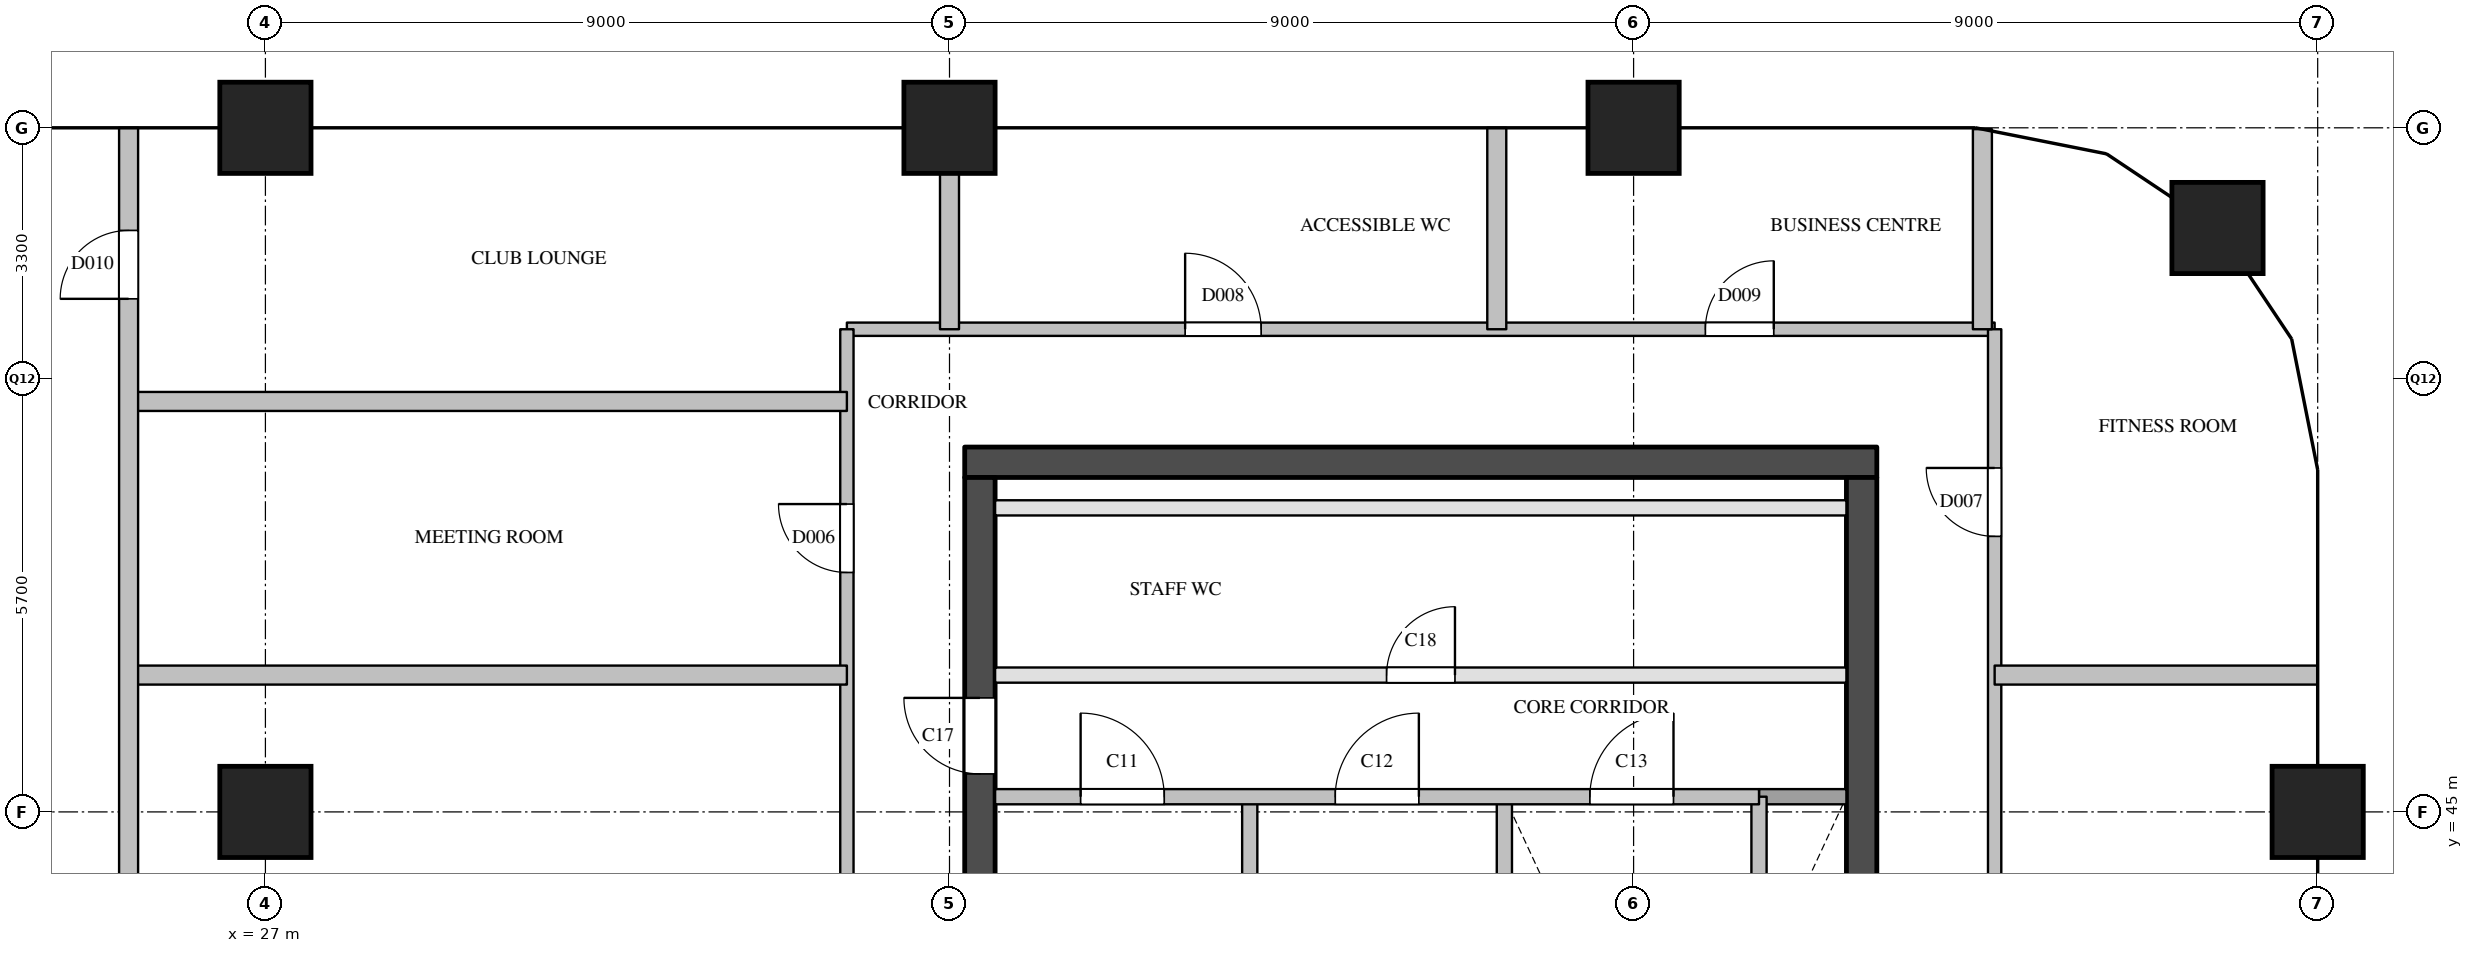
"""IFC4 building model, lengths in metres.
Left out: names, types, materials, properties, quantities, classifications, styles, units other than length and angle.
Written with IfcOpenShell. Run it as: python <this file> out.ifc"""

import sys

from ifc_helpers import new_model, si_unit, direction, frame, frame_2d, origin, origin_2d, place, context, subcontext, project, spatial, rectangle, extrude, element, fill, save


model = new_model("IFC4")
c1 = context("Model", 3, precision=1e-05, world=origin(), true_north=direction((0.0, 1.0)))
c2 = subcontext(c1, "Body", "Model", "MODEL_VIEW")
j1 = project(units=[si_unit("LENGTHUNIT", "METRE"), si_unit("PLANEANGLEUNIT", "RADIAN")], contexts=[c1])
p1 = place(None, origin())
s1 = spatial("IfcSite", under=j1, at=p1, CompositionType="ELEMENT")
p2 = place(p1, origin())
s2 = spatial("IfcBuilding", under=s1, at=p2, CompositionType="ELEMENT")
p3 = place(p2, frame((0.0, 0.0, 281.3)))
s3 = spatial("IfcBuildingStorey", under=s2, at=p3, CompositionType="ELEMENT", Elevation=281.3)
for number, where, z_axis, x_axis in (
    (1, (27.0, 45.0, 0.0), (0.0, 0.0, 1.0), (1.0, 0.0, 0.0)),
    (2, (27.0, 54.0, 0.0), (0.0, 0.0, 1.0), (1.0, 0.0, 0.0)),
    (3, (36.0, 54.0, 0.0), (0.0, 0.0, 1.0), (1.0, 0.0, 0.0)),
    (4, (45.0, 54.0, 0.0), (0.0, 0.0, 1.0), (1.0, 0.0, 0.0)),
    (5, (54.0, 45.0, 0.0), (0.0, 0.0, 1.0), (1.0, 0.0, 0.0)),
    (6, (52.682, 52.682, 0.0), (0.0, 0.0, 1.0), (1.0, 0.0, 0.0)),
):
    element("IfcColumn", number, at=place(p3, frame(where, z_axis=z_axis, x_axis=x_axis)), inside=s3, PredefinedType="COLUMN", context=c2, shape_type="SweptSolid", body=[
        extrude(rectangle(XDim=1.2, YDim=1.2, at=origin_2d()), origin(), (0.0, 0.0, 1.0), 3.9),
    ])
p4 = place(p3, frame((36.2, 49.6, 0.0), z_axis=(0.0, 0.0, 1.0), x_axis=(1.0, 0.0, 0.0)))
e7 = element("IfcWall", 7, at=p4, inside=s3, PredefinedType="SHEAR", context=c2, shape_type="SweptSolid", body=[
    extrude(rectangle(XDim=12.0, YDim=0.4, at=frame_2d((6.0, 0.0))), origin(), (0.0, 0.0, 1.0), 3.6),
])
p5 = place(p3, frame((36.4, 29.1, 0.0), z_axis=(0.0, 0.0, 1.0), x_axis=(0.0, 1.0, 0.0)))
e8 = element("IfcWall", 8, at=p5, inside=s3, PredefinedType="SHEAR", context=c2, shape_type="SweptSolid", body=[
    extrude(rectangle(XDim=20.3, YDim=0.4, at=frame_2d((10.15, 0.0))), origin(), (0.0, 0.0, 1.0), 3.6),
])
p6 = place(p5, frame((3.6, 0.0, 0.0)))
e9 = element("IfcOpeningElement", 9, at=p6, cuts=e8, PredefinedType="OPENING", context=c2, shape_type="SweptSolid", body=[
    extrude(rectangle(XDim=1.8, YDim=2.1, at=frame_2d((0.9, 1.05))), frame((0.0, 0.21, 0.0), z_axis=(0.0, -1.0, 0.0), x_axis=(1.0, 0.0, 0.0)), (0.0, 0.0, 1.0), 0.42),
])
p7 = place(p5, frame((16.4, 0.0, 0.0)))
e10 = element("IfcOpeningElement", 10, at=p7, cuts=e8, PredefinedType="OPENING", context=c2, shape_type="SweptSolid", body=[
    extrude(rectangle(XDim=1.0, YDim=2.1, at=frame_2d((0.5, 1.05))), frame((0.0, 0.21, 0.0), z_axis=(0.0, -1.0, 0.0), x_axis=(1.0, 0.0, 0.0)), (0.0, 0.0, 1.0), 0.42),
])
p8 = place(p3, frame((48.0, 29.1, 0.0), z_axis=(0.0, 0.0, 1.0), x_axis=(0.0, 1.0, 0.0)))
e11 = element("IfcWall", 11, at=p8, inside=s3, PredefinedType="SHEAR", context=c2, shape_type="SweptSolid", body=[
    extrude(rectangle(XDim=20.3, YDim=0.4, at=frame_2d((10.15, 0.0))), origin(), (0.0, 0.0, 1.0), 3.6),
])
p9 = place(p8, frame((12.5, 0.0, 0.0)))
e12 = element("IfcOpeningElement", 12, at=p9, cuts=e11, PredefinedType="OPENING", context=c2, shape_type="SweptSolid", body=[
    extrude(rectangle(XDim=0.7, YDim=2.1, at=frame_2d((0.35, 1.05))), frame((0.0, 0.21, 0.0), z_axis=(0.0, -1.0, 0.0), x_axis=(1.0, 0.0, 0.0)), (0.0, 0.0, 1.0), 0.42),
])
p10 = place(p8, frame((3.9, 0.0, 0.0)))
e13 = element("IfcOpeningElement", 13, at=p10, cuts=e11, PredefinedType="OPENING", context=c2, shape_type="SweptSolid", body=[
    extrude(rectangle(XDim=1.8, YDim=2.1, at=frame_2d((0.9, 1.05))), frame((0.0, 0.21, 0.0), z_axis=(0.0, -1.0, 0.0), x_axis=(1.0, 0.0, 0.0)), (0.0, 0.0, 1.0), 0.42),
])
for number, where, z_axis, x_axis in (
    (14, (39.95, 40.78, 0.0), (0.0, 0.0, 1.0), (0.0, 1.0, 0.0)),
    (15, (43.3, 40.78, 0.0), (0.0, 0.0, 1.0), (0.0, 1.0, 0.0)),
    (16, (46.65, 40.78, 0.0), (0.0, 0.0, 1.0), (0.0, 1.0, 0.0)),
):
    element("IfcWall", number, at=place(p3, frame(where, z_axis=z_axis, x_axis=x_axis)), inside=s3, PredefinedType="SOLIDWALL", context=c2, shape_type="SweptSolid", body=[
        extrude(rectangle(XDim=4.42, YDim=0.2, at=frame_2d((2.21, 0.0))), origin(), (0.0, 0.0, 1.0), 3.6),
    ])
p11 = place(p3, frame((46.65, 45.2, 0.0), z_axis=(0.0, 0.0, 1.0), x_axis=(1.0, 0.0, 0.0)))
e17 = element("IfcWall", 17, at=p11, inside=s3, PredefinedType="SOLIDWALL", context=c2, shape_type="SweptSolid", body=[
    extrude(rectangle(XDim=1.15, YDim=0.2, at=frame_2d((0.575, 0.0))), origin(), (0.0, 0.0, 1.0), 3.6),
])
p12 = place(p3, frame((36.6, 45.2, 0.0), z_axis=(0.0, 0.0, 1.0), x_axis=(1.0, 0.0, 0.0)))
e18 = element("IfcWall", 18, at=p12, inside=s3, PredefinedType="SOLIDWALL", context=c2, shape_type="SweptSolid", body=[
    extrude(rectangle(XDim=10.05, YDim=0.2, at=frame_2d((5.025, 0.0))), origin(), (0.0, 0.0, 1.0), 3.6),
])
p13 = place(p12, frame((1.125, 0.0, 0.0)))
e19 = element("IfcOpeningElement", 19, at=p13, cuts=e18, PredefinedType="OPENING", context=c2, shape_type="SweptSolid", body=[
    extrude(rectangle(XDim=1.1, YDim=2.1, at=frame_2d((0.55, 1.05))), frame((0.0, 0.11, 0.0), z_axis=(0.0, -1.0, 0.0), x_axis=(1.0, 0.0, 0.0)), (0.0, 0.0, 1.0), 0.22),
])
p14 = place(p12, frame((4.475, 0.0, 0.0)))
e20 = element("IfcOpeningElement", 20, at=p14, cuts=e18, PredefinedType="OPENING", context=c2, shape_type="SweptSolid", body=[
    extrude(rectangle(XDim=1.1, YDim=2.1, at=frame_2d((0.55, 1.05))), frame((0.0, 0.11, 0.0), z_axis=(0.0, -1.0, 0.0), x_axis=(1.0, 0.0, 0.0)), (0.0, 0.0, 1.0), 0.22),
])
p15 = place(p12, frame((7.825, 0.0, 0.0)))
e21 = element("IfcOpeningElement", 21, at=p15, cuts=e18, PredefinedType="OPENING", context=c2, shape_type="SweptSolid", body=[
    extrude(rectangle(XDim=1.1, YDim=2.1, at=frame_2d((0.55, 1.05))), frame((0.0, 0.11, 0.0), z_axis=(0.0, -1.0, 0.0), x_axis=(1.0, 0.0, 0.0)), (0.0, 0.0, 1.0), 0.22),
])
p16 = place(p3, frame((36.6, 46.8, 0.0), z_axis=(0.0, 0.0, 1.0), x_axis=(1.0, 0.0, 0.0)))
e22 = element("IfcWall", 22, at=p16, inside=s3, PredefinedType="PARTITIONING", context=c2, shape_type="SweptSolid", body=[
    extrude(rectangle(XDim=11.2, YDim=0.2, at=frame_2d((5.6, 0.0))), origin(), (0.0, 0.0, 1.0), 3.6),
])
p17 = place(p16, frame((5.15, 0.0, 0.0)))
e23 = element("IfcOpeningElement", 23, at=p17, cuts=e22, PredefinedType="OPENING", context=c2, shape_type="SweptSolid", body=[
    extrude(rectangle(XDim=0.9, YDim=2.1, at=frame_2d((0.45, 1.05))), frame((0.0, 0.11, 0.0), z_axis=(0.0, -1.0, 0.0), x_axis=(1.0, 0.0, 0.0)), (0.0, 0.0, 1.0), 0.22),
])
p18 = place(p3, frame((36.6, 49.0, 0.0), z_axis=(0.0, 0.0, 1.0), x_axis=(1.0, 0.0, 0.0)))
e24 = element("IfcWall", 24, at=p18, inside=s3, PredefinedType="PARTITIONING", context=c2, shape_type="SweptSolid", body=[
    extrude(rectangle(XDim=11.2, YDim=0.2, at=frame_2d((5.6, 0.0))), origin(), (0.0, 0.0, 1.0), 3.6),
])
p19 = place(p3, frame((34.65, 51.35, 0.0), z_axis=(0.0, 0.0, 1.0), x_axis=(1.0, 0.0, 0.0)))
e25 = element("IfcWall", 25, at=p19, inside=s3, PredefinedType="PARTITIONING", context=c2, shape_type="SweptSolid", body=[
    extrude(rectangle(XDim=15.1, YDim=0.175, at=frame_2d((7.55, 0.0))), origin(), (0.0, 0.0, 1.0), 3.6),
])
p20 = place(p19, frame((4.45, 0.0, 0.0)))
e26 = element("IfcOpeningElement", 26, at=p20, cuts=e25, PredefinedType="OPENING", context=c2, shape_type="SweptSolid", body=[
    extrude(rectangle(XDim=1.0, YDim=2.1, at=frame_2d((0.5, 1.05))), frame((0.0, 0.097, 0.0), z_axis=(0.0, -1.0, 0.0), x_axis=(1.0, 0.0, 0.0)), (0.0, 0.0, 1.0), 0.195),
])
p21 = place(p19, frame((11.294, 0.0, 0.0)))
e27 = element("IfcOpeningElement", 27, at=p21, cuts=e25, PredefinedType="OPENING", context=c2, shape_type="SweptSolid", body=[
    extrude(rectangle(XDim=0.9, YDim=2.1, at=frame_2d((0.45, 1.05))), frame((0.0, 0.097, 0.0), z_axis=(0.0, -1.0, 0.0), x_axis=(1.0, 0.0, 0.0)), (0.0, 0.0, 1.0), 0.195),
])
p22 = place(p3, frame((34.65, 28.5, 0.0), z_axis=(0.0, 0.0, 1.0), x_axis=(0.0, 1.0, 0.0)))
e28 = element("IfcWall", 28, at=p22, inside=s3, PredefinedType="PARTITIONING", context=c2, shape_type="SweptSolid", body=[
    extrude(rectangle(XDim=22.85, YDim=0.175, at=frame_2d((11.425, 0.0))), origin(), (0.0, 0.0, 1.0), 3.6),
])
p23 = place(p22, frame((3.3, 0.0, 0.0)))
e29 = element("IfcOpeningElement", 29, at=p23, cuts=e28, PredefinedType="OPENING", context=c2, shape_type="SweptSolid", body=[
    extrude(rectangle(XDim=0.9, YDim=2.1, at=frame_2d((0.45, 1.05))), frame((0.0, 0.097, 0.0), z_axis=(0.0, -1.0, 0.0), x_axis=(1.0, 0.0, 0.0)), (0.0, 0.0, 1.0), 0.195),
])
p24 = place(p22, frame((8.8, 0.0, 0.0)))
e30 = element("IfcOpeningElement", 30, at=p24, cuts=e28, PredefinedType="OPENING", context=c2, shape_type="SweptSolid", body=[
    extrude(rectangle(XDim=1.0, YDim=2.1, at=frame_2d((0.5, 1.05))), frame((0.0, 0.097, 0.0), z_axis=(0.0, -1.0, 0.0), x_axis=(1.0, 0.0, 0.0)), (0.0, 0.0, 1.0), 0.195),
])
p25 = place(p22, frame((14.2, 0.0, 0.0)))
e31 = element("IfcOpeningElement", 31, at=p25, cuts=e28, PredefinedType="OPENING", context=c2, shape_type="SweptSolid", body=[
    extrude(rectangle(XDim=1.0, YDim=2.1, at=frame_2d((0.5, 1.05))), frame((0.0, 0.097, 0.0), z_axis=(0.0, -1.0, 0.0), x_axis=(1.0, 0.0, 0.0)), (0.0, 0.0, 1.0), 0.195),
])
p26 = place(p22, frame((19.65, 0.0, 0.0)))
e32 = element("IfcOpeningElement", 32, at=p26, cuts=e28, PredefinedType="OPENING", context=c2, shape_type="SweptSolid", body=[
    extrude(rectangle(XDim=0.9, YDim=2.1, at=frame_2d((0.45, 1.05))), frame((0.0, 0.097, 0.0), z_axis=(0.0, -1.0, 0.0), x_axis=(1.0, 0.0, 0.0)), (0.0, 0.0, 1.0), 0.195),
])
p27 = place(p3, frame((49.75, 28.5, 0.0), z_axis=(0.0, 0.0, 1.0), x_axis=(0.0, 1.0, 0.0)))
e33 = element("IfcWall", 33, at=p27, inside=s3, PredefinedType="PARTITIONING", context=c2, shape_type="SweptSolid", body=[
    extrude(rectangle(XDim=22.85, YDim=0.175, at=frame_2d((11.425, 0.0))), origin(), (0.0, 0.0, 1.0), 3.6),
])
p28 = place(p27, frame((3.3, 0.0, 0.0)))
e34 = element("IfcOpeningElement", 34, at=p28, cuts=e33, PredefinedType="OPENING", context=c2, shape_type="SweptSolid", body=[
    extrude(rectangle(XDim=0.9, YDim=2.1, at=frame_2d((0.45, 1.05))), frame((0.0, 0.097, 0.0), z_axis=(0.0, -1.0, 0.0), x_axis=(1.0, 0.0, 0.0)), (0.0, 0.0, 1.0), 0.195),
])
p29 = place(p27, frame((12.45, 0.0, 0.0)))
e35 = element("IfcOpeningElement", 35, at=p29, cuts=e33, PredefinedType="OPENING", context=c2, shape_type="SweptSolid", body=[
    extrude(rectangle(XDim=0.9, YDim=2.1, at=frame_2d((0.45, 1.05))), frame((0.0, 0.097, 0.0), z_axis=(0.0, -1.0, 0.0), x_axis=(1.0, 0.0, 0.0)), (0.0, 0.0, 1.0), 0.195),
])
p30 = place(p27, frame((20.125, 0.0, 0.0)))
e36 = element("IfcOpeningElement", 36, at=p30, cuts=e33, PredefinedType="OPENING", context=c2, shape_type="SweptSolid", body=[
    extrude(rectangle(XDim=0.9, YDim=2.1, at=frame_2d((0.45, 1.05))), frame((0.0, 0.097, 0.0), z_axis=(0.0, -1.0, 0.0), x_axis=(1.0, 0.0, 0.0)), (0.0, 0.0, 1.0), 0.195),
])
p31 = place(p3, frame((25.2, 46.8, 0.0), z_axis=(0.0, 0.0, 1.0), x_axis=(1.0, 0.0, 0.0)))
e37 = element("IfcWall", 37, at=p31, inside=s3, PredefinedType="PARTITIONING", context=c2, shape_type="SweptSolid", body=[
    extrude(rectangle(XDim=9.45, YDim=0.25, at=frame_2d((4.725, 0.0))), origin(), (0.0, 0.0, 1.0), 2.6),
])
p32 = place(p3, frame((49.75, 46.8, 0.0), z_axis=(0.0, 0.0, 1.0), x_axis=(1.0, 0.0, 0.0)))
e38 = element("IfcWall", 38, at=p32, inside=s3, PredefinedType="PARTITIONING", context=c2, shape_type="SweptSolid", body=[
    extrude(rectangle(XDim=4.25, YDim=0.25, at=frame_2d((2.125, 0.0))), origin(), (0.0, 0.0, 1.0), 2.6),
])
p33 = place(p3, frame((25.2, 50.4, 0.0), z_axis=(0.0, 0.0, 1.0), x_axis=(1.0, 0.0, 0.0)))
e39 = element("IfcWall", 39, at=p33, inside=s3, PredefinedType="PARTITIONING", context=c2, shape_type="SweptSolid", body=[
    extrude(rectangle(XDim=9.45, YDim=0.25, at=frame_2d((4.725, 0.0))), origin(), (0.0, 0.0, 1.0), 2.6),
])
p34 = place(p3, frame((25.2, 35.875, 0.0), z_axis=(0.0, 0.0, 1.0), x_axis=(0.0, 1.0, 0.0)))
e40 = element("IfcWall", 40, at=p34, inside=s3, PredefinedType="PARTITIONING", context=c2, shape_type="SweptSolid", body=[
    extrude(rectangle(XDim=18.125, YDim=0.25, at=frame_2d((9.062, 0.0))), origin(), (0.0, 0.0, 1.0), 2.6),
])
p35 = place(p34, frame((15.875, 0.0, 0.0)))
e41 = element("IfcOpeningElement", 41, at=p35, cuts=e40, PredefinedType="OPENING", context=c2, shape_type="SweptSolid", body=[
    extrude(rectangle(XDim=0.9, YDim=2.1, at=frame_2d((0.45, 1.05))), frame((0.0, 0.135, 0.0), z_axis=(0.0, -1.0, 0.0), x_axis=(1.0, 0.0, 0.0)), (0.0, 0.0, 1.0), 0.27),
])
p36 = place(p3, frame((36.0, 51.35, 0.0), z_axis=(0.0, 0.0, 1.0), x_axis=(0.0, 1.0, 0.0)))
e42 = element("IfcWall", 42, at=p36, inside=s3, PredefinedType="PARTITIONING", context=c2, shape_type="SweptSolid", body=[
    extrude(rectangle(XDim=2.65, YDim=0.25, at=frame_2d((1.325, 0.0))), origin(), (0.0, 0.0, 1.0), 3.6),
])
p37 = place(p3, frame((43.2, 51.35, 0.0), z_axis=(0.0, 0.0, 1.0), x_axis=(0.0, 1.0, 0.0)))
e43 = element("IfcWall", 43, at=p37, inside=s3, PredefinedType="PARTITIONING", context=c2, shape_type="SweptSolid", body=[
    extrude(rectangle(XDim=2.65, YDim=0.25, at=frame_2d((1.325, 0.0))), origin(), (0.0, 0.0, 1.0), 2.6),
])
p38 = place(p3, frame((49.589, 51.35, 0.0), z_axis=(0.0, 0.0, 1.0), x_axis=(0.0, 1.0, 0.0)))
e44 = element("IfcWall", 44, at=p38, inside=s3, PredefinedType="PARTITIONING", context=c2, shape_type="SweptSolid", body=[
    extrude(rectangle(XDim=2.632, YDim=0.25, at=frame_2d((1.316, 0.0))), origin(), (0.0, 0.0, 1.0), 2.6),
])
p39 = place(p13, origin())
e45 = element("IfcDoor", 45, at=p39, inside=s3, OperationType="SINGLE_SWING_LEFT", PredefinedType="DOOR", context=c2, shape_type="SweptSolid", body=[
    extrude(rectangle(XDim=1.1, YDim=2.1, at=frame_2d((0.55, 1.05))), frame((0.0, 0.025, 0.0), z_axis=(0.0, -1.0, 0.0), x_axis=(1.0, 0.0, 0.0)), (0.0, 0.0, 1.0), 0.05),
])
fill(e19, e45)
p40 = place(p14, origin())
e46 = element("IfcDoor", 46, at=p40, inside=s3, OperationType="SINGLE_SWING_RIGHT", PredefinedType="DOOR", context=c2, shape_type="SweptSolid", body=[
    extrude(rectangle(XDim=1.1, YDim=2.1, at=frame_2d((0.55, 1.05))), frame((0.0, 0.025, 0.0), z_axis=(0.0, -1.0, 0.0), x_axis=(1.0, 0.0, 0.0)), (0.0, 0.0, 1.0), 0.05),
])
fill(e20, e46)
p41 = place(p15, origin())
e47 = element("IfcDoor", 47, at=p41, inside=s3, OperationType="SINGLE_SWING_RIGHT", PredefinedType="DOOR", context=c2, shape_type="SweptSolid", body=[
    extrude(rectangle(XDim=1.1, YDim=2.1, at=frame_2d((0.55, 1.05))), frame((0.0, 0.025, 0.0), z_axis=(0.0, -1.0, 0.0), x_axis=(1.0, 0.0, 0.0)), (0.0, 0.0, 1.0), 0.05),
])
fill(e21, e47)
p42 = place(p7, origin())
e48 = element("IfcDoor", 48, at=p42, inside=s3, OperationType="SINGLE_SWING_RIGHT", PredefinedType="DOOR", context=c2, shape_type="SweptSolid", body=[
    extrude(rectangle(XDim=1.0, YDim=2.1, at=frame_2d((0.5, 1.05))), frame((0.0, 0.025, 0.0), z_axis=(0.0, -1.0, 0.0), x_axis=(1.0, 0.0, 0.0)), (0.0, 0.0, 1.0), 0.05),
])
fill(e10, e48)
p43 = place(p17, origin())
e49 = element("IfcDoor", 49, at=p43, inside=s3, OperationType="SINGLE_SWING_RIGHT", PredefinedType="DOOR", context=c2, shape_type="SweptSolid", body=[
    extrude(rectangle(XDim=0.9, YDim=2.1, at=frame_2d((0.45, 1.05))), frame((0.0, 0.025, 0.0), z_axis=(0.0, -1.0, 0.0), x_axis=(1.0, 0.0, 0.0)), (0.0, 0.0, 1.0), 0.05),
])
fill(e23, e49)
p44 = place(p26, origin())
e50 = element("IfcDoor", 50, at=p44, inside=s3, OperationType="SINGLE_SWING_RIGHT", PredefinedType="DOOR", context=c2, shape_type="SweptSolid", body=[
    extrude(rectangle(XDim=0.9, YDim=2.1, at=frame_2d((0.45, 1.05))), frame((0.0, 0.025, 0.0), z_axis=(0.0, -1.0, 0.0), x_axis=(1.0, 0.0, 0.0)), (0.0, 0.0, 1.0), 0.05),
])
fill(e32, e50)
p45 = place(p30, origin())
e51 = element("IfcDoor", 51, at=p45, inside=s3, OperationType="SINGLE_SWING_RIGHT", PredefinedType="DOOR", context=c2, shape_type="SweptSolid", body=[
    extrude(rectangle(XDim=0.9, YDim=2.1, at=frame_2d((0.45, 1.05))), frame((0.0, 0.025, 0.0), z_axis=(0.0, -1.0, 0.0), x_axis=(1.0, 0.0, 0.0)), (0.0, 0.0, 1.0), 0.05),
])
fill(e36, e51)
p46 = place(p20, origin())
e52 = element("IfcDoor", 52, at=p46, inside=s3, OperationType="SINGLE_SWING_LEFT", PredefinedType="DOOR", context=c2, shape_type="SweptSolid", body=[
    extrude(rectangle(XDim=1.0, YDim=2.1, at=frame_2d((0.5, 1.05))), frame((0.0, 0.025, 0.0), z_axis=(0.0, -1.0, 0.0), x_axis=(1.0, 0.0, 0.0)), (0.0, 0.0, 1.0), 0.05),
])
fill(e26, e52)
p47 = place(p21, origin())
e53 = element("IfcDoor", 53, at=p47, inside=s3, OperationType="SINGLE_SWING_RIGHT", PredefinedType="DOOR", context=c2, shape_type="SweptSolid", body=[
    extrude(rectangle(XDim=0.9, YDim=2.1, at=frame_2d((0.45, 1.05))), frame((0.0, 0.025, 0.0), z_axis=(0.0, -1.0, 0.0), x_axis=(1.0, 0.0, 0.0)), (0.0, 0.0, 1.0), 0.05),
])
fill(e27, e53)
p48 = place(p35, origin())
e54 = element("IfcDoor", 54, at=p48, inside=s3, OperationType="SINGLE_SWING_LEFT", PredefinedType="DOOR", context=c2, shape_type="SweptSolid", body=[
    extrude(rectangle(XDim=0.9, YDim=2.1, at=frame_2d((0.45, 1.05))), frame((0.0, 0.025, 0.0), z_axis=(0.0, -1.0, 0.0), x_axis=(1.0, 0.0, 0.0)), (0.0, 0.0, 1.0), 0.05),
])
fill(e41, e54)
save(model, sys.argv[1])
